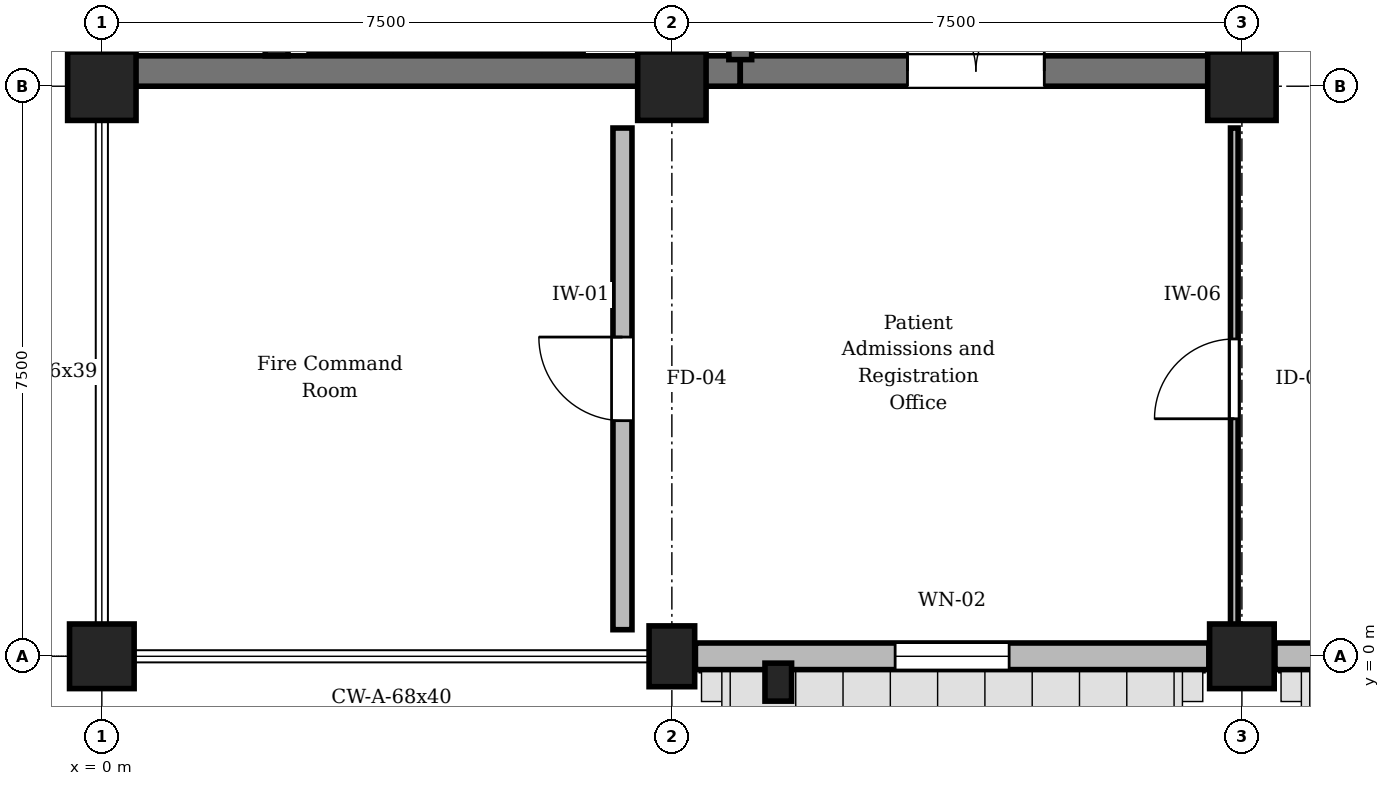
"""IFC4 building model, lengths in metres.
Left out: names, types, materials, properties, quantities, classifications, styles, units other than length and angle.
Written with IfcOpenShell. Run it as: python <this file> out.ifc"""

import sys

from ifc_helpers import new_model, si_unit, direction, frame, frame_2d, origin, origin_with_axes, origin_2d, place, context, subcontext, project, spatial, rectangle, circle, i_section, extrude, element, fill, save


model = new_model("IFC4")
c1 = context("Model", 3, precision=1e-05, world=origin(), true_north=direction((0.0, 1.0)))
c2 = subcontext(c1, "Body", "Model", "MODEL_VIEW")
j1 = project(units=[si_unit("LENGTHUNIT", "METRE"), si_unit("PLANEANGLEUNIT", "RADIAN")], contexts=[c1])
p1 = place(None, origin())
s1 = spatial("IfcSite", under=j1, at=p1, CompositionType="ELEMENT")
p2 = place(p1, origin())
s2 = spatial("IfcBuilding", under=s1, at=p2, CompositionType="ELEMENT")
p3 = place(p2, origin())
s3 = spatial("IfcBuildingStorey", under=s2, at=p3, CompositionType="ELEMENT", Elevation=0.0)
p4 = place(p3, origin_with_axes())
e1 = element("IfcColumn", 1, at=p4, inside=s3, PredefinedType="COLUMN", context=c2, shape_type="SweptSolid", body=[
    extrude(rectangle(XDim=0.85, YDim=0.85, at=origin_2d()), origin(), (0.0, 0.0, 1.0), 4.8),
])
p5 = place(p3, frame((0.0, 7.5, 0.0), z_axis=(0.0, 0.0, 1.0), x_axis=(1.0, 0.0, 0.0)))
e2 = element("IfcColumn", 2, at=p5, inside=s3, PredefinedType="COLUMN", context=c2, shape_type="SweptSolid", body=[
    extrude(rectangle(XDim=0.9, YDim=0.9, at=origin_2d()), origin(), (0.0, 0.0, 1.0), 4.8),
])
p6 = place(p3, frame((7.5, 0.0, 0.0), z_axis=(0.0, 0.0, 1.0), x_axis=(1.0, 0.0, 0.0)))
e3 = element("IfcColumn", 3, at=p6, inside=s3, PredefinedType="COLUMN", context=c2, shape_type="SweptSolid", body=[
    extrude(rectangle(XDim=0.6, YDim=0.8, at=origin_2d()), origin(), (0.0, 0.0, 1.0), 4.8),
])
p7 = place(p3, frame((7.5, 7.5, 0.0), z_axis=(0.0, 0.0, 1.0), x_axis=(1.0, 0.0, 0.0)))
e4 = element("IfcColumn", 4, at=p7, inside=s3, PredefinedType="COLUMN", context=c2, shape_type="SweptSolid", body=[
    extrude(rectangle(XDim=0.9, YDim=0.9, at=origin_2d()), origin(), (0.0, 0.0, 1.0), 4.8),
])
p8 = place(p3, frame((15.0, 0.0, 0.0), z_axis=(0.0, 0.0, 1.0), x_axis=(1.0, 0.0, 0.0)))
e5 = element("IfcColumn", 5, at=p8, inside=s3, PredefinedType="COLUMN", context=c2, shape_type="SweptSolid", body=[
    extrude(rectangle(XDim=0.85, YDim=0.85, at=origin_2d()), origin(), (0.0, 0.0, 1.0), 4.8),
])
p9 = place(p3, frame((15.0, 7.5, 0.0), z_axis=(0.0, 0.0, 1.0), x_axis=(1.0, 0.0, 0.0)))
e6 = element("IfcColumn", 6, at=p9, inside=s3, PredefinedType="COLUMN", context=c2, shape_type="SweptSolid", body=[
    extrude(circle(Radius=0.45, at=origin_2d()), origin(), (0.0, 0.0, 1.0), 4.8),
])
p10 = place(p3, frame((8.9, -0.34, 0.0), z_axis=(0.0, 0.0, 1.0), x_axis=(1.0, 0.0, 0.0)))
e7 = element("IfcColumn", 7, at=p10, inside=s3, PredefinedType="PILASTER", context=c2, shape_type="SweptSolid", body=[
    extrude(rectangle(XDim=0.35, YDim=0.5, at=origin_2d()), origin(), (0.0, 0.0, 1.0), 4.1),
])
p11 = place(p3, frame((2.3, 8.05, 0.0), z_axis=(0.0, 0.0, 1.0), x_axis=(1.0, 0.0, 0.0)))
e8 = element("IfcColumn", 8, at=p11, inside=s3, PredefinedType="COLUMN", context=c2, shape_type="SweptSolid", body=[
    extrude(i_section(OverallWidth=0.3, OverallDepth=0.3, WebThickness=0.011, FlangeThickness=0.019, FilletRadius=0.027, at=origin_2d()), origin(), (0.0, 0.0, 1.0), 4.8),
])
p12 = place(p3, frame((14.565, 0.0, 0.0), z_axis=(0.0, 0.0, 1.0), x_axis=(-1.0, 0.0, 0.0)))
e9 = element("IfcWall", 9, at=p12, inside=s3, PredefinedType="STANDARD", context=c2, shape_type="SweptSolid", body=[
    extrude(rectangle(XDim=6.755, YDim=0.35, at=frame_2d((3.377, 0.0))), origin(), (0.0, 0.0, 1.0), 3.95),
])
p13 = place(p12, frame((2.627, 0.0, 0.9)))
e10 = element("IfcOpeningElement", 10, at=p13, cuts=e9, PredefinedType="OPENING", context=c2, shape_type="SweptSolid", body=[
    extrude(rectangle(XDim=1.5, YDim=2.4, at=frame_2d((0.75, 1.2))), frame((0.0, 0.185, 0.0), z_axis=(0.0, -1.0, 0.0), x_axis=(1.0, 0.0, 0.0)), (0.0, 0.0, 1.0), 0.37),
])
p14 = place(p3, frame((22.19, 0.0, 0.0), z_axis=(0.0, 0.0, 1.0), x_axis=(-1.0, 0.0, 0.0)))
e11 = element("IfcWall", 11, at=p14, inside=s3, PredefinedType="STANDARD", context=c2, shape_type="SweptSolid", body=[
    extrude(rectangle(XDim=6.755, YDim=0.35, at=frame_2d((3.377, 0.0))), origin(), (0.0, 0.0, 1.0), 3.95),
])
p15 = place(p14, frame((2.327, 0.0, 0.9)))
e12 = element("IfcOpeningElement", 12, at=p15, cuts=e11, PredefinedType="OPENING", context=c2, shape_type="SweptSolid", body=[
    extrude(rectangle(XDim=2.1, YDim=2.4, at=frame_2d((1.05, 1.2))), frame((0.0, 0.185, 0.0), z_axis=(0.0, -1.0, 0.0), x_axis=(1.0, 0.0, 0.0)), (0.0, 0.0, 1.0), 0.37),
])
p16 = place(p3, frame((0.35, 7.7, 0.0), z_axis=(0.0, 0.0, 1.0), x_axis=(1.0, 0.0, 0.0)))
e13 = element("IfcWall", 13, at=p16, inside=s3, PredefinedType="SHEAR", context=c2, shape_type="SweptSolid", body=[
    extrude(rectangle(XDim=8.05, YDim=0.4, at=frame_2d((4.025, 0.0))), origin(), (0.0, 0.0, 1.0), 4.5),
])
p17 = place(p3, frame((8.4, 7.7, 0.0), z_axis=(0.0, 0.0, 1.0), x_axis=(1.0, 0.0, 0.0)))
e14 = element("IfcWall", 14, at=p17, inside=s3, PredefinedType="SHEAR", context=c2, shape_type="SweptSolid", body=[
    extrude(rectangle(XDim=6.25, YDim=0.4, at=frame_2d((3.125, 0.0))), origin(), (0.0, 0.0, 1.0), 4.5),
])
p18 = place(p17, frame((2.2, 0.0, 0.0)))
e15 = element("IfcOpeningElement", 15, at=p18, cuts=e14, PredefinedType="OPENING", context=c2, shape_type="SweptSolid", body=[
    extrude(rectangle(XDim=1.8, YDim=2.25, at=frame_2d((0.9, 1.125))), frame((0.0, 0.21, 0.0), z_axis=(0.0, -1.0, 0.0), x_axis=(1.0, 0.0, 0.0)), (0.0, 0.0, 1.0), 0.42),
])
p19 = place(p3, frame((14.8, 7.85, 0.0), z_axis=(0.0, 0.0, 1.0), x_axis=(0.0, 1.0, 0.0)))
e16 = element("IfcWall", 16, at=p19, inside=s3, PredefinedType="SHEAR", context=c2, shape_type="SweptSolid", body=[
    extrude(rectangle(XDim=3.75, YDim=0.4, at=frame_2d((1.875, 0.0))), origin(), (0.0, 0.0, 1.0), 4.5),
])
p20 = place(p3, frame((8.4, 11.5, 0.0), z_axis=(0.0, 0.0, 1.0), x_axis=(0.0, -1.0, 0.0)))
e17 = element("IfcWall", 17, at=p20, inside=s3, PredefinedType="SHEAR", context=c2, shape_type="SweptSolid", body=[
    extrude(rectangle(XDim=3.65, YDim=0.3, at=frame_2d((1.825, 0.0))), origin(), (0.0, 0.0, 1.0), 4.5),
])
p21 = place(p20, frame((1.22, 0.0, 0.0)))
e18 = element("IfcOpeningElement", 18, at=p21, cuts=e17, PredefinedType="OPENING", context=c2, shape_type="SweptSolid", body=[
    extrude(rectangle(XDim=1.2, YDim=2.25, at=frame_2d((0.6, 1.125))), frame((0.0, 0.16, 0.0), z_axis=(0.0, -1.0, 0.0), x_axis=(1.0, 0.0, 0.0)), (0.0, 0.0, 1.0), 0.32),
])
p22 = place(p3, frame((6.85, 0.35, 0.0), z_axis=(0.0, 0.0, 1.0), x_axis=(0.0, 1.0, 0.0)))
e19 = element("IfcWall", 19, at=p22, inside=s3, PredefinedType="STANDARD", context=c2, shape_type="SweptSolid", body=[
    extrude(rectangle(XDim=6.6, YDim=0.25, at=frame_2d((3.3, 0.0))), origin(), (0.0, 0.0, 1.0), 4.485),
])
p23 = place(p22, frame((2.75, 0.0, 0.0)))
e20 = element("IfcOpeningElement", 20, at=p23, cuts=e19, PredefinedType="OPENING", context=c2, shape_type="SweptSolid", body=[
    extrude(rectangle(XDim=1.1, YDim=2.2, at=frame_2d((0.55, 1.1))), frame((0.0, 0.135, 0.0), z_axis=(0.0, -1.0, 0.0), x_axis=(1.0, 0.0, 0.0)), (0.0, 0.0, 1.0), 0.27),
])
p24 = place(p3, frame((14.9, 0.35, 0.0), z_axis=(0.0, 0.0, 1.0), x_axis=(0.0, 1.0, 0.0)))
e21 = element("IfcWall", 21, at=p24, inside=s3, PredefinedType="PARTITIONING", context=c2, shape_type="SweptSolid", body=[
    extrude(rectangle(XDim=6.6, YDim=0.1, at=frame_2d((3.3, 0.0))), origin(), (0.0, 0.0, 1.0), 3.935),
])
p25 = place(p24, frame((2.775, 0.0, 0.0)))
e22 = element("IfcOpeningElement", 22, at=p25, cuts=e21, PredefinedType="OPENING", context=c2, shape_type="SweptSolid", body=[
    extrude(rectangle(XDim=1.05, YDim=2.2, at=frame_2d((0.525, 1.1))), frame((0.0, 0.06, 0.0), z_axis=(0.0, -1.0, 0.0), x_axis=(1.0, 0.0, 0.0)), (0.0, 0.0, 1.0), 0.12),
])
p26 = place(p13, origin())
e23 = element("IfcWindow", 23, at=p26, inside=s3, PartitioningType="SINGLE_PANEL", PredefinedType="WINDOW", context=c2, shape_type="SweptSolid", body=[
    extrude(rectangle(XDim=1.5, YDim=2.4, at=frame_2d((0.75, 1.2))), frame((0.0, 0.03, 0.0), z_axis=(0.0, -1.0, 0.0), x_axis=(1.0, 0.0, 0.0)), (0.0, 0.0, 1.0), 0.06),
])
fill(e10, e23)
p27 = place(p18, origin())
e24 = element("IfcDoor", 24, at=p27, inside=s3, OperationType="DOUBLE_DOOR_SINGLE_SWING", PredefinedType="DOOR", context=c2, shape_type="SweptSolid", body=[
    extrude(rectangle(XDim=1.8, YDim=2.25, at=frame_2d((0.9, 1.125))), frame((0.0, 0.025, 0.0), z_axis=(0.0, -1.0, 0.0), x_axis=(1.0, 0.0, 0.0)), (0.0, 0.0, 1.0), 0.05),
])
fill(e15, e24)
p28 = place(p23, origin())
e25 = element("IfcDoor", 25, at=p28, inside=s3, OperationType="SINGLE_SWING_RIGHT", PredefinedType="DOOR", context=c2, shape_type="SweptSolid", body=[
    extrude(rectangle(XDim=1.1, YDim=2.2, at=frame_2d((0.55, 1.1))), frame((0.0, 0.025, 0.0), z_axis=(0.0, -1.0, 0.0), x_axis=(1.0, 0.0, 0.0)), (0.0, 0.0, 1.0), 0.05),
])
fill(e20, e25)
p29 = place(p25, origin())
e26 = element("IfcDoor", 26, at=p29, inside=s3, OperationType="SINGLE_SWING_LEFT", PredefinedType="DOOR", context=c2, shape_type="SweptSolid", body=[
    extrude(rectangle(XDim=1.05, YDim=2.2, at=frame_2d((0.525, 1.1))), frame((0.0, 0.025, 0.0), z_axis=(0.0, -1.0, 0.0), x_axis=(1.0, 0.0, 0.0)), (0.0, 0.0, 1.0), 0.05),
])
fill(e22, e26)
save(model, sys.argv[1])
